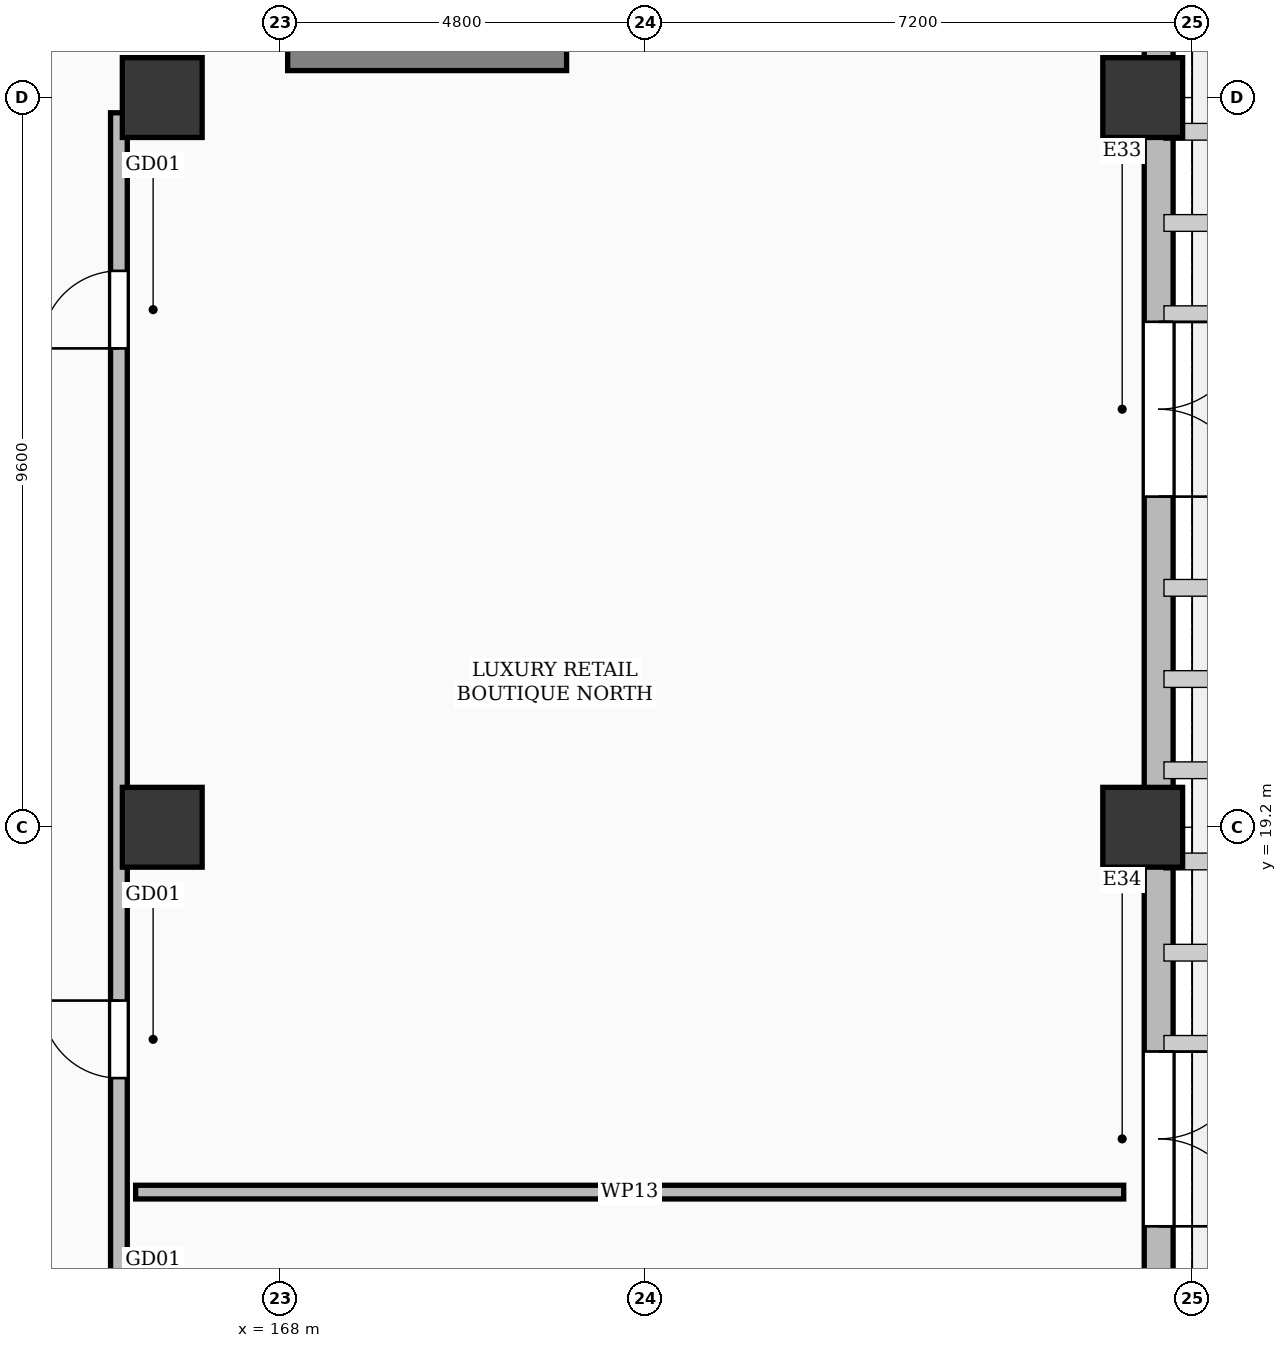
"""IFC4 building model, lengths in metres.
Left out: names, types, materials, properties, quantities, classifications, styles, units other than length and angle.
Written with IfcOpenShell. Run it as: python <this file> out.ifc"""

import sys

from ifc_helpers import new_model, si_unit, direction, frame, frame_2d, origin, origin_2d, place, context, subcontext, project, spatial, rectangle, extrude, element, fill, save


model = new_model("IFC4")
c1 = context("Model", 3, precision=1e-05, world=origin(), true_north=direction((0.0, 1.0)))
c2 = subcontext(c1, "Body", "Model", "MODEL_VIEW")
j1 = project(units=[si_unit("LENGTHUNIT", "METRE"), si_unit("PLANEANGLEUNIT", "RADIAN")], contexts=[c1])
p1 = place(None, origin())
s1 = spatial("IfcSite", under=j1, at=p1, CompositionType="ELEMENT")
p2 = place(p1, origin())
s2 = spatial("IfcBuilding", under=s1, at=p2, CompositionType="ELEMENT")
p3 = place(p2, origin())
s3 = spatial("IfcBuildingStorey", under=s2, at=p3, CompositionType="ELEMENT", Elevation=0.0)
for number, where, z_axis, x_axis in (
    (1, (166.45, 19.2, 0.0), (0.0, 0.0, 1.0), (1.0, 0.0, 0.0)),
    (2, (166.45, 28.8, 0.0), (0.0, 0.0, 1.0), (1.0, 0.0, 0.0)),
    (3, (179.35, 19.2, 0.0), (0.0, 0.0, 1.0), (1.0, 0.0, 0.0)),
    (4, (179.35, 28.8, 0.0), (0.0, 0.0, 1.0), (1.0, 0.0, 0.0)),
):
    element("IfcColumn", number, at=place(p3, frame(where, z_axis=z_axis, x_axis=x_axis)), inside=s3, PredefinedType="COLUMN", context=c2, shape_type="SweptSolid", body=[
        extrude(rectangle(XDim=1.05, YDim=1.05, at=origin_2d()), origin(), (0.0, 0.0, 1.0), 6.0),
    ])
p4 = place(p3, frame((179.56, 125.85, 0.0), z_axis=(0.0, 0.0, 1.0), x_axis=(0.0, -1.0, 0.0)))
e5 = element("IfcWall", 5, at=p4, inside=s3, PredefinedType="SOLIDWALL", context=c2, shape_type="SweptSolid", body=[
    extrude(rectangle(XDim=125.7, YDim=0.38, at=frame_2d((62.85, 0.0))), origin(), (0.0, 0.0, 1.0), 4.692),
])
p5 = place(p4, frame((4.0, 0.0, 0.0)))
e6 = element("IfcOpeningElement", 6, at=p5, cuts=e5, PredefinedType="OPENING", context=c2, shape_type="SweptSolid", body=[
    extrude(rectangle(XDim=2.3, YDim=2.4, at=frame_2d((1.15, 1.2))), frame((0.0, 0.202, 0.0), z_axis=(0.0, -1.0, 0.0), x_axis=(1.0, 0.0, 0.0)), (0.0, 0.0, 1.0), 0.404),
])
p6 = place(p4, frame((13.6, 0.0, 0.0)))
e7 = element("IfcOpeningElement", 7, at=p6, cuts=e5, PredefinedType="OPENING", context=c2, shape_type="SweptSolid", body=[
    extrude(rectangle(XDim=2.3, YDim=2.4, at=frame_2d((1.15, 1.2))), frame((0.0, 0.202, 0.0), z_axis=(0.0, -1.0, 0.0), x_axis=(1.0, 0.0, 0.0)), (0.0, 0.0, 1.0), 0.404),
])
p7 = place(p4, frame((23.2, 0.0, 0.0)))
e8 = element("IfcOpeningElement", 8, at=p7, cuts=e5, PredefinedType="OPENING", context=c2, shape_type="SweptSolid", body=[
    extrude(rectangle(XDim=2.3, YDim=2.4, at=frame_2d((1.15, 1.2))), frame((0.0, 0.202, 0.0), z_axis=(0.0, -1.0, 0.0), x_axis=(1.0, 0.0, 0.0)), (0.0, 0.0, 1.0), 0.404),
])
p8 = place(p4, frame((32.8, 0.0, 0.0)))
e9 = element("IfcOpeningElement", 9, at=p8, cuts=e5, PredefinedType="OPENING", context=c2, shape_type="SweptSolid", body=[
    extrude(rectangle(XDim=2.3, YDim=2.4, at=frame_2d((1.15, 1.2))), frame((0.0, 0.202, 0.0), z_axis=(0.0, -1.0, 0.0), x_axis=(1.0, 0.0, 0.0)), (0.0, 0.0, 1.0), 0.404),
])
p9 = place(p4, frame((42.4, 0.0, 0.0)))
e10 = element("IfcOpeningElement", 10, at=p9, cuts=e5, PredefinedType="OPENING", context=c2, shape_type="SweptSolid", body=[
    extrude(rectangle(XDim=2.3, YDim=2.4, at=frame_2d((1.15, 1.2))), frame((0.0, 0.202, 0.0), z_axis=(0.0, -1.0, 0.0), x_axis=(1.0, 0.0, 0.0)), (0.0, 0.0, 1.0), 0.404),
])
p10 = place(p4, frame((52.0, 0.0, 0.0)))
e11 = element("IfcOpeningElement", 11, at=p10, cuts=e5, PredefinedType="OPENING", context=c2, shape_type="SweptSolid", body=[
    extrude(rectangle(XDim=2.3, YDim=2.4, at=frame_2d((1.15, 1.2))), frame((0.0, 0.202, 0.0), z_axis=(0.0, -1.0, 0.0), x_axis=(1.0, 0.0, 0.0)), (0.0, 0.0, 1.0), 0.404),
])
p11 = place(p4, frame((61.6, 0.0, 0.0)))
e12 = element("IfcOpeningElement", 12, at=p11, cuts=e5, PredefinedType="OPENING", context=c2, shape_type="SweptSolid", body=[
    extrude(rectangle(XDim=2.3, YDim=2.4, at=frame_2d((1.15, 1.2))), frame((0.0, 0.202, 0.0), z_axis=(0.0, -1.0, 0.0), x_axis=(1.0, 0.0, 0.0)), (0.0, 0.0, 1.0), 0.404),
])
p12 = place(p4, frame((71.2, 0.0, 0.0)))
e13 = element("IfcOpeningElement", 13, at=p12, cuts=e5, PredefinedType="OPENING", context=c2, shape_type="SweptSolid", body=[
    extrude(rectangle(XDim=2.3, YDim=2.4, at=frame_2d((1.15, 1.2))), frame((0.0, 0.202, 0.0), z_axis=(0.0, -1.0, 0.0), x_axis=(1.0, 0.0, 0.0)), (0.0, 0.0, 1.0), 0.404),
])
p13 = place(p4, frame((80.8, 0.0, 0.0)))
e14 = element("IfcOpeningElement", 14, at=p13, cuts=e5, PredefinedType="OPENING", context=c2, shape_type="SweptSolid", body=[
    extrude(rectangle(XDim=2.3, YDim=2.4, at=frame_2d((1.15, 1.2))), frame((0.0, 0.202, 0.0), z_axis=(0.0, -1.0, 0.0), x_axis=(1.0, 0.0, 0.0)), (0.0, 0.0, 1.0), 0.404),
])
p14 = place(p4, frame((90.4, 0.0, 0.0)))
e15 = element("IfcOpeningElement", 15, at=p14, cuts=e5, PredefinedType="OPENING", context=c2, shape_type="SweptSolid", body=[
    extrude(rectangle(XDim=2.3, YDim=2.4, at=frame_2d((1.15, 1.2))), frame((0.0, 0.202, 0.0), z_axis=(0.0, -1.0, 0.0), x_axis=(1.0, 0.0, 0.0)), (0.0, 0.0, 1.0), 0.404),
])
p15 = place(p4, frame((100.0, 0.0, 0.0)))
e16 = element("IfcOpeningElement", 16, at=p15, cuts=e5, PredefinedType="OPENING", context=c2, shape_type="SweptSolid", body=[
    extrude(rectangle(XDim=2.3, YDim=2.4, at=frame_2d((1.15, 1.2))), frame((0.0, 0.202, 0.0), z_axis=(0.0, -1.0, 0.0), x_axis=(1.0, 0.0, 0.0)), (0.0, 0.0, 1.0), 0.404),
])
p16 = place(p4, frame((109.6, 0.0, 0.0)))
e17 = element("IfcOpeningElement", 17, at=p16, cuts=e5, PredefinedType="OPENING", context=c2, shape_type="SweptSolid", body=[
    extrude(rectangle(XDim=2.3, YDim=2.4, at=frame_2d((1.15, 1.2))), frame((0.0, 0.202, 0.0), z_axis=(0.0, -1.0, 0.0), x_axis=(1.0, 0.0, 0.0)), (0.0, 0.0, 1.0), 0.404),
])
p17 = place(p4, frame((94.15, 0.0, 0.0)))
e18 = element("IfcOpeningElement", 18, at=p17, cuts=e5, PredefinedType="OPENING", context=c2, shape_type="SweptSolid", body=[
    extrude(rectangle(XDim=1.9, YDim=2.45, at=frame_2d((0.95, 1.225))), frame((0.0, 0.202, 0.0), z_axis=(0.0, -1.0, 0.0), x_axis=(1.0, 0.0, 0.0)), (0.0, 0.0, 1.0), 0.404),
])
p18 = place(p4, frame((113.35, 0.0, 0.0)))
e19 = element("IfcOpeningElement", 19, at=p18, cuts=e5, PredefinedType="OPENING", context=c2, shape_type="SweptSolid", body=[
    extrude(rectangle(XDim=1.9, YDim=2.45, at=frame_2d((0.95, 1.225))), frame((0.0, 0.202, 0.0), z_axis=(0.0, -1.0, 0.0), x_axis=(1.0, 0.0, 0.0)), (0.0, 0.0, 1.0), 0.404),
])
p19 = place(p3, frame((168.1, 29.38, 0.0), z_axis=(0.0, 0.0, 1.0), x_axis=(1.0, 0.0, 0.0)))
e20 = element("IfcWall", 20, at=p19, inside=s3, PredefinedType="SHEAR", context=c2, shape_type="SweptSolid", body=[
    extrude(rectangle(XDim=3.67, YDim=0.45, at=frame_2d((1.835, 0.0))), origin(), (0.0, 0.0, 1.0), 5.7),
])
p20 = place(p3, frame((165.88, 0.35, 0.0), z_axis=(0.0, 0.0, 1.0), x_axis=(0.0, 1.0, 0.0)))
e21 = element("IfcWall", 21, at=p20, inside=s3, PredefinedType="PARTITIONING", context=c2, shape_type="SweptSolid", body=[
    extrude(rectangle(XDim=28.25, YDim=0.22, at=frame_2d((14.125, 0.0))), origin(), (0.0, 0.0, 1.0), 4.692),
])
p21 = place(p20, frame((1.95, 0.0, 0.0)))
e22 = element("IfcOpeningElement", 22, at=p21, cuts=e21, PredefinedType="OPENING", context=c2, shape_type="SweptSolid", body=[
    extrude(rectangle(XDim=1.02, YDim=2.2, at=frame_2d((0.51, 1.1))), frame((0.0, 0.122, 0.0), z_axis=(0.0, -1.0, 0.0), x_axis=(1.0, 0.0, 0.0)), (0.0, 0.0, 1.0), 0.244),
])
p22 = place(p20, frame((10.75, 0.0, 0.0)))
e23 = element("IfcOpeningElement", 23, at=p22, cuts=e21, PredefinedType="OPENING", context=c2, shape_type="SweptSolid", body=[
    extrude(rectangle(XDim=1.02, YDim=2.2, at=frame_2d((0.51, 1.1))), frame((0.0, 0.122, 0.0), z_axis=(0.0, -1.0, 0.0), x_axis=(1.0, 0.0, 0.0)), (0.0, 0.0, 1.0), 0.244),
])
p23 = place(p20, frame((15.55, 0.0, 0.0)))
e24 = element("IfcOpeningElement", 24, at=p23, cuts=e21, PredefinedType="OPENING", context=c2, shape_type="SweptSolid", body=[
    extrude(rectangle(XDim=1.02, YDim=2.2, at=frame_2d((0.51, 1.1))), frame((0.0, 0.122, 0.0), z_axis=(0.0, -1.0, 0.0), x_axis=(1.0, 0.0, 0.0)), (0.0, 0.0, 1.0), 0.244),
])
p24 = place(p20, frame((25.15, 0.0, 0.0)))
e25 = element("IfcOpeningElement", 25, at=p24, cuts=e21, PredefinedType="OPENING", context=c2, shape_type="SweptSolid", body=[
    extrude(rectangle(XDim=1.02, YDim=2.2, at=frame_2d((0.51, 1.1))), frame((0.0, 0.122, 0.0), z_axis=(0.0, -1.0, 0.0), x_axis=(1.0, 0.0, 0.0)), (0.0, 0.0, 1.0), 0.244),
])
p25 = place(p3, frame((166.1, 14.4, 0.0), z_axis=(0.0, 0.0, 1.0), x_axis=(1.0, 0.0, 0.0)))
e26 = element("IfcWall", 26, at=p25, inside=s3, PredefinedType="PARTITIONING", context=c2, shape_type="SweptSolid", body=[
    extrude(rectangle(XDim=13.0, YDim=0.18, at=frame_2d((6.5, 0.0))), origin(), (0.0, 0.0, 1.0), 4.692),
])
p26 = place(p15, origin())
e27 = element("IfcDoor", 27, at=p26, inside=s3, OperationType="DOUBLE_DOOR_SINGLE_SWING", PredefinedType="DOOR", context=c2, shape_type="SweptSolid", body=[
    extrude(rectangle(XDim=2.3, YDim=2.4, at=frame_2d((1.15, 1.2))), frame((0.0, 0.025, 0.0), z_axis=(0.0, -1.0, 0.0), x_axis=(1.0, 0.0, 0.0)), (0.0, 0.0, 1.0), 0.05),
])
fill(e16, e27)
p27 = place(p16, origin())
e28 = element("IfcDoor", 28, at=p27, inside=s3, OperationType="DOUBLE_DOOR_SINGLE_SWING", PredefinedType="DOOR", context=c2, shape_type="SweptSolid", body=[
    extrude(rectangle(XDim=2.3, YDim=2.4, at=frame_2d((1.15, 1.2))), frame((0.0, 0.025, 0.0), z_axis=(0.0, -1.0, 0.0), x_axis=(1.0, 0.0, 0.0)), (0.0, 0.0, 1.0), 0.05),
])
fill(e17, e28)
p28 = place(p23, origin())
e29 = element("IfcDoor", 29, at=p28, inside=s3, OperationType="SINGLE_SWING_RIGHT", PredefinedType="DOOR", context=c2, shape_type="SweptSolid", body=[
    extrude(rectangle(XDim=1.02, YDim=2.2, at=frame_2d((0.51, 1.1))), frame((0.0, 0.025, 0.0), z_axis=(0.0, -1.0, 0.0), x_axis=(1.0, 0.0, 0.0)), (0.0, 0.0, 1.0), 0.05),
])
fill(e24, e29)
p29 = place(p24, origin())
e30 = element("IfcDoor", 30, at=p29, inside=s3, OperationType="SINGLE_SWING_LEFT", PredefinedType="DOOR", context=c2, shape_type="SweptSolid", body=[
    extrude(rectangle(XDim=1.02, YDim=2.2, at=frame_2d((0.51, 1.1))), frame((0.0, 0.025, 0.0), z_axis=(0.0, -1.0, 0.0), x_axis=(1.0, 0.0, 0.0)), (0.0, 0.0, 1.0), 0.05),
])
fill(e25, e30)
save(model, sys.argv[1])
